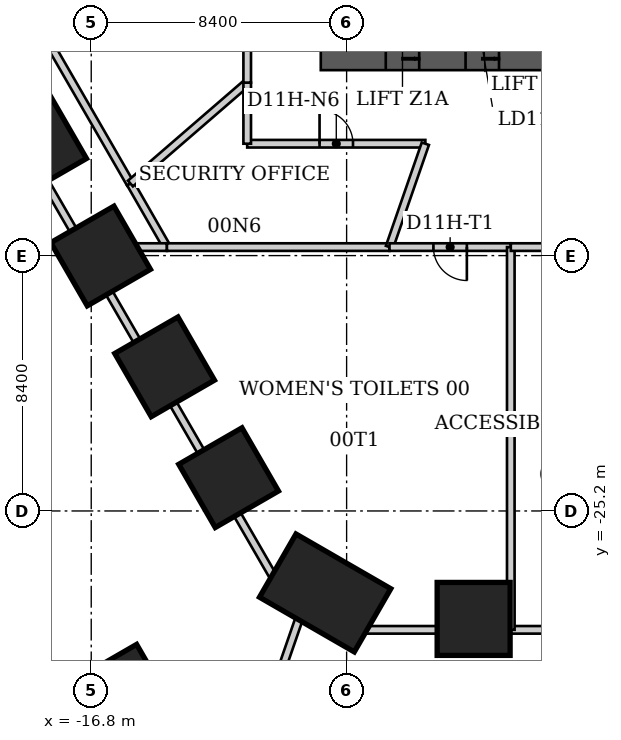
"""IFC4 building model, lengths in metres.
Left out: names, types, materials, properties, quantities, classifications, styles, units other than length and angle.
Written with IfcOpenShell. Run it as: python <this file> out.ifc"""

import sys

from ifc_helpers import new_model, si_unit, direction, frame, frame_2d, origin, origin_2d, place, context, subcontext, project, spatial, rectangle, extrude, element, fill, save


model = new_model("IFC4")
c1 = context("Model", 3, precision=1e-05, world=origin(), true_north=direction((0.0, 1.0)))
c2 = subcontext(c1, "Body", "Model", "MODEL_VIEW")
j1 = project(units=[si_unit("LENGTHUNIT", "METRE"), si_unit("PLANEANGLEUNIT", "RADIAN")], contexts=[c1])
p1 = place(None, origin())
s1 = spatial("IfcSite", under=j1, at=p1, CompositionType="ELEMENT")
p2 = place(p1, origin())
s2 = spatial("IfcBuilding", under=s1, at=p2, CompositionType="ELEMENT")
p3 = place(p2, origin())
s3 = spatial("IfcBuildingStorey", under=s2, at=p3, CompositionType="ELEMENT", Elevation=0.0)
p4 = place(p3, frame((-4.222, -28.751, -0.2), z_axis=(0.0, 0.0, 1.0), x_axis=(0.0, -1.0, 0.0)))
e1 = element("IfcColumn", 1, at=p4, inside=s3, PredefinedType="COLUMN", context=c2, shape_type="SweptSolid", body=[
    extrude(rectangle(XDim=2.4, YDim=2.4, at=origin_2d()), origin(), (0.0, 0.0, 1.0), 6.2),
])
p5 = place(p3, frame((-9.106, -27.897, -0.2), z_axis=(0.0, 0.0, 1.0), x_axis=(-0.5, -0.866025403784, 0.0)))
e2 = element("IfcColumn", 2, at=p5, inside=s3, PredefinedType="COLUMN", context=c2, shape_type="SweptSolid", body=[
    extrude(rectangle(XDim=2.4, YDim=3.6, at=origin_2d()), origin(), (0.0, 0.0, 1.0), 6.2),
])
for number, where, z_axis, x_axis in (
    (3, (-12.282, -24.105, -0.2), (0.0, 0.0, 1.0), (-0.866, -0.5, 0.0)),
    (4, (-14.387, -20.459, -0.2), (0.0, 0.0, 1.0), (-0.866, -0.5, 0.0)),
    (5, (-16.491, -16.813, -0.2), (0.0, 0.0, 1.0), (-0.866, -0.5, 0.0)),
    (6, (-18.596, -13.167, -0.2), (0.0, 0.0, 1.0), (-0.866, -0.5, 0.0)),
):
    element("IfcColumn", number, at=place(p3, frame(where, z_axis=z_axis, x_axis=x_axis)), inside=s3, PredefinedType="COLUMN", context=c2, shape_type="SweptSolid", body=[
        extrude(rectangle(XDim=2.4, YDim=2.4, at=origin_2d()), origin(), (0.0, 0.0, 1.0), 6.2),
    ])
p6 = place(p3, frame((-15.563, -30.546, -0.2), z_axis=(0.0, 0.0, 1.0), x_axis=(-0.866025403784, -0.5, 0.0)))
e7 = element("IfcColumn", 7, at=p6, inside=s3, PredefinedType="COLUMN", context=c2, shape_type="SweptSolid", body=[
    extrude(rectangle(XDim=1.4, YDim=1.4, at=origin_2d()), origin(), (0.0, 0.0, 1.0), 6.2),
])
p7 = place(p3, frame((-9.25, -9.95, -0.2), z_axis=(0.0, 0.0, 1.0), x_axis=(1.0, 0.0, 0.0)))
e8 = element("IfcWall", 8, at=p7, inside=s3, PredefinedType="SHEAR", context=c2, shape_type="SweptSolid", body=[
    extrude(rectangle(XDim=18.5, YDim=1.5, at=frame_2d((9.25, 0.0))), origin(), (0.0, 0.0, 1.0), 6.2),
])
p8 = place(p7, frame((2.137, 0.0, 0.2)))
e9 = element("IfcOpeningElement", 9, at=p8, cuts=e8, PredefinedType="OPENING", context=c2, shape_type="SweptSolid", body=[
    extrude(rectangle(XDim=1.1, YDim=2.1, at=frame_2d((0.55, 1.05))), frame((0.0, 0.75, 0.0), z_axis=(0.0, -1.0, 0.0), x_axis=(1.0, 0.0, 0.0)), (0.0, 0.0, 1.0), 1.5),
])
p9 = place(p7, frame((4.762, 0.0, 0.2)))
e10 = element("IfcOpeningElement", 10, at=p9, cuts=e8, PredefinedType="OPENING", context=c2, shape_type="SweptSolid", body=[
    extrude(rectangle(XDim=1.1, YDim=2.1, at=frame_2d((0.55, 1.05))), frame((0.0, 0.75, 0.0), z_axis=(0.0, -1.0, 0.0), x_axis=(1.0, 0.0, 0.0)), (0.0, 0.0, 1.0), 1.5),
])
p10 = place(p7, frame((7.387, 0.0, 0.2)))
e11 = element("IfcOpeningElement", 11, at=p10, cuts=e8, PredefinedType="OPENING", context=c2, shape_type="SweptSolid", body=[
    extrude(rectangle(XDim=1.1, YDim=2.1, at=frame_2d((0.55, 1.05))), frame((0.0, 0.75, 0.0), z_axis=(0.0, -1.0, 0.0), x_axis=(1.0, 0.0, 0.0)), (0.0, 0.0, 1.0), 1.5),
])
p11 = place(p7, frame((10.012, 0.0, 0.2)))
e12 = element("IfcOpeningElement", 12, at=p11, cuts=e8, PredefinedType="OPENING", context=c2, shape_type="SweptSolid", body=[
    extrude(rectangle(XDim=1.1, YDim=2.1, at=frame_2d((0.55, 1.05))), frame((0.0, 0.75, 0.0), z_axis=(0.0, -1.0, 0.0), x_axis=(1.0, 0.0, 0.0)), (0.0, 0.0, 1.0), 1.5),
])
p12 = place(p7, frame((12.637, 0.0, 0.2)))
e13 = element("IfcOpeningElement", 13, at=p12, cuts=e8, PredefinedType="OPENING", context=c2, shape_type="SweptSolid", body=[
    extrude(rectangle(XDim=1.1, YDim=2.1, at=frame_2d((0.55, 1.05))), frame((0.0, 0.75, 0.0), z_axis=(0.0, -1.0, 0.0), x_axis=(1.0, 0.0, 0.0)), (0.0, 0.0, 1.0), 1.5),
])
p13 = place(p7, frame((15.262, 0.0, 0.2)))
e14 = element("IfcOpeningElement", 14, at=p13, cuts=e8, PredefinedType="OPENING", context=c2, shape_type="SweptSolid", body=[
    extrude(rectangle(XDim=1.1, YDim=2.1, at=frame_2d((0.55, 1.05))), frame((0.0, 0.75, 0.0), z_axis=(0.0, -1.0, 0.0), x_axis=(1.0, 0.0, 0.0)), (0.0, 0.0, 1.0), 1.5),
])
p14 = place(p3, frame((-27.14, 5.71, 0.0), z_axis=(0.0, 0.0, 1.0), x_axis=(0.499871788402, -0.866099414132, 0.0)))
e15 = element("IfcWall", 15, at=p14, inside=s3, PredefinedType="PARTITIONING", context=c2, shape_type="SweptSolid", body=[
    extrude(rectangle(XDim=23.257, YDim=0.25, at=frame_2d((11.628, 0.0))), origin(), (0.0, 0.0, 1.0), 5.84),
])
p15 = place(p14, frame((9.979, 0.0, 0.0)))
e16 = element("IfcOpeningElement", 16, at=p15, cuts=e15, PredefinedType="OPENING", context=c2, shape_type="SweptSolid", body=[
    extrude(rectangle(XDim=1.6, YDim=2.4, at=frame_2d((0.8, 1.2))), frame((0.0, 0.125, 0.0), z_axis=(0.0, -1.0, 0.0), x_axis=(1.0, 0.0, 0.0)), (0.0, 0.0, 1.0), 0.25),
])
p16 = place(p3, frame((-21.66, -8.58, 0.0), z_axis=(0.0, 0.0, 1.0), x_axis=(0.50046740921, -0.865755376719, 0.0)))
e17 = element("IfcWall", 17, at=p16, inside=s3, PredefinedType="PARTITIONING", context=c2, shape_type="SweptSolid", body=[
    extrude(rectangle(XDim=9.171, YDim=0.25, at=frame_2d((4.585, 0.0))), origin(), (0.0, 0.0, 1.0), 4.04),
])
p17 = place(p16, frame((3.086, 0.0, 0.0)))
e18 = element("IfcOpeningElement", 18, at=p17, cuts=e17, PredefinedType="OPENING", context=c2, shape_type="SweptSolid", body=[
    extrude(rectangle(XDim=1.1, YDim=2.2, at=frame_2d((0.55, 1.1))), frame((0.0, 0.125, 0.0), z_axis=(0.0, -1.0, 0.0), x_axis=(1.0, 0.0, 0.0)), (0.0, 0.0, 1.0), 0.25),
])
p18 = place(p3, frame((-17.08, -16.52, 0.0), z_axis=(0.0, 0.0, 1.0), x_axis=(0.500484795969, -0.865745325719, 0.0)))
e19 = element("IfcWall", 19, at=p18, inside=s3, PredefinedType="PARTITIONING", context=c2, shape_type="SweptSolid", body=[
    extrude(rectangle(XDim=13.387, YDim=0.25, at=frame_2d((6.694, 0.0))), origin(), (0.0, 0.0, 1.0), 4.04),
])
p19 = place(p3, frame((-15.87, -45.802, 0.0), z_axis=(0.0, 0.0, 1.0), x_axis=(0.327267371913, 0.944931779168, 0.0)))
e20 = element("IfcWall", 20, at=p19, inside=s3, PredefinedType="PARTITIONING", context=c2, shape_type="SweptSolid", body=[
    extrude(rectangle(XDim=18.395, YDim=0.25, at=frame_2d((9.197, 0.0))), origin(), (0.0, 0.0, 1.0), 5.75),
])
p20 = place(p3, frame((-15.51, -14.43, 0.0), z_axis=(0.0, 0.0, 1.0), x_axis=(0.497894326365, -0.867237706614, 0.0)))
e21 = element("IfcWall", 21, at=p20, inside=s3, PredefinedType="PARTITIONING", context=c2, shape_type="SweptSolid", body=[
    extrude(rectangle(XDim=2.41, YDim=0.25, at=frame_2d((1.205, 0.0))), origin(), (0.0, 0.0, 1.0), 5.84),
])
p21 = place(p3, frame((-14.31, -16.52, 0.0), z_axis=(0.0, 0.0, 1.0), x_axis=(-1.0, 0.0, 0.0)))
e22 = element("IfcWall", 22, at=p21, inside=s3, PredefinedType="PARTITIONING", context=c2, shape_type="SweptSolid", body=[
    extrude(rectangle(XDim=2.76, YDim=0.25, at=frame_2d((1.38, 0.0))), origin(), (0.0, 0.0, 1.0), 5.84),
])
p22 = place(p3, frame((-11.67, -13.12, 0.0), z_axis=(0.0, 0.0, 1.0), x_axis=(1.0, 0.0, 0.0)))
e23 = element("IfcWall", 23, at=p22, inside=s3, PredefinedType="PARTITIONING", context=c2, shape_type="SweptSolid", body=[
    extrude(rectangle(XDim=5.86, YDim=0.25, at=frame_2d((2.93, 0.0))), origin(), (0.0, 0.0, 1.0), 5.84),
])
p23 = place(p22, frame((2.38, 0.0, 0.0)))
e24 = element("IfcOpeningElement", 24, at=p23, cuts=e23, PredefinedType="OPENING", context=c2, shape_type="SweptSolid", body=[
    extrude(rectangle(XDim=1.1, YDim=2.2, at=frame_2d((0.55, 1.1))), frame((0.0, 0.125, 0.0), z_axis=(0.0, -1.0, 0.0), x_axis=(1.0, 0.0, 0.0)), (0.0, 0.0, 1.0), 0.25),
])
p24 = place(p3, frame((-11.67, -11.11, 0.0), z_axis=(0.0, 0.0, 1.0), x_axis=(-0.756493073491, -0.654001704707, 0.0)))
e25 = element("IfcWall", 25, at=p24, inside=s3, PredefinedType="PARTITIONING", context=c2, shape_type="SweptSolid", body=[
    extrude(rectangle(XDim=5.076, YDim=0.25, at=frame_2d((2.538, 0.0))), origin(), (0.0, 0.0, 1.0), 5.238),
])
p25 = place(p3, frame((-11.67, -11.11, 0.0), z_axis=(0.0, 0.0, 1.0), x_axis=(0.0, -1.0, 0.0)))
e26 = element("IfcWall", 26, at=p25, inside=s3, PredefinedType="PARTITIONING", context=c2, shape_type="SweptSolid", body=[
    extrude(rectangle(XDim=2.01, YDim=0.25, at=frame_2d((1.005, 0.0))), origin(), (0.0, 0.0, 1.0), 5.84),
])
p26 = place(p3, frame((-11.67, 10.02, 0.0), z_axis=(0.0, 0.0, 1.0), x_axis=(0.0, -1.0, 0.0)))
e27 = element("IfcWall", 27, at=p26, inside=s3, PredefinedType="PARTITIONING", context=c2, shape_type="SweptSolid", body=[
    extrude(rectangle(XDim=21.13, YDim=0.25, at=frame_2d((10.565, 0.0))), origin(), (0.0, 0.0, 1.0), 5.84),
])
p27 = place(p3, frame((-10.38, -28.11, 0.0), z_axis=(0.0, 0.0, 1.0), x_axis=(0.865714845822, -0.5005375168, 0.0)))
e28 = element("IfcWall", 28, at=p27, inside=s3, PredefinedType="PARTITIONING", context=c2, shape_type="SweptSolid", body=[
    extrude(rectangle(XDim=0.579, YDim=0.25, at=frame_2d((0.29, 0.0))), origin(), (0.0, 0.0, 1.0), 5.84),
])
p28 = place(p3, frame((-8.65, -29.11, 0.0), z_axis=(0.0, 0.0, 1.0), x_axis=(-0.866883441829, 0.498510880807, 0.0)))
e29 = element("IfcWall", 29, at=p28, inside=s3, PredefinedType="PARTITIONING", context=c2, shape_type="SweptSolid", body=[
    extrude(rectangle(XDim=1.385, YDim=0.25, at=frame_2d((0.692, 0.0))), origin(), (0.0, 0.0, 1.0), 5.84),
])
p29 = place(p3, frame((-8.65, -29.11, 0.0), z_axis=(0.0, 0.0, 1.0), x_axis=(1.0, 0.0, 0.0)))
e30 = element("IfcWall", 30, at=p29, inside=s3, PredefinedType="PARTITIONING", context=c2, shape_type="SweptSolid", body=[
    extrude(rectangle(XDim=5.65, YDim=0.25, at=frame_2d((2.825, 0.0))), origin(), (0.0, 0.0, 1.0), 4.04),
])
p30 = place(p3, frame((-6.99, -16.52, 0.0), z_axis=(0.0, 0.0, 1.0), x_axis=(-1.0, 0.0, 0.0)))
e31 = element("IfcWall", 31, at=p30, inside=s3, PredefinedType="PARTITIONING", context=c2, shape_type="SweptSolid", body=[
    extrude(rectangle(XDim=7.32, YDim=0.25, at=frame_2d((3.66, 0.0))), origin(), (0.0, 0.0, 1.0), 5.84),
])
p31 = place(p3, frame((-5.81, -13.12, 0.0), z_axis=(0.0, 0.0, 1.0), x_axis=(-0.327865380048, -0.944724453249, 0.0)))
e32 = element("IfcWall", 32, at=p31, inside=s3, PredefinedType="PARTITIONING", context=c2, shape_type="SweptSolid", body=[
    extrude(rectangle(XDim=3.599, YDim=0.25, at=frame_2d((1.799, 0.0))), origin(), (0.0, 0.0, 1.0), 5.84),
])
p32 = place(p3, frame((-3.0, -29.11, 0.0), z_axis=(0.0, 0.0, 1.0), x_axis=(1.0, 0.0, 0.0)))
e33 = element("IfcWall", 33, at=p32, inside=s3, PredefinedType="PARTITIONING", context=c2, shape_type="SweptSolid", body=[
    extrude(rectangle(XDim=6.0, YDim=0.25, at=frame_2d((3.0, 0.0))), origin(), (0.0, 0.0, 1.0), 4.04),
])
p33 = place(p3, frame((-3.0, -16.52, 0.0), z_axis=(0.0, 0.0, 1.0), x_axis=(-1.0, 0.0, 0.0)))
e34 = element("IfcWall", 34, at=p33, inside=s3, PredefinedType="PARTITIONING", context=c2, shape_type="SweptSolid", body=[
    extrude(rectangle(XDim=3.99, YDim=0.25, at=frame_2d((1.995, 0.0))), origin(), (0.0, 0.0, 1.0), 5.84),
])
p34 = place(p33, frame((1.445, 0.0, 0.0)))
e35 = element("IfcOpeningElement", 35, at=p34, cuts=e34, PredefinedType="OPENING", context=c2, shape_type="SweptSolid", body=[
    extrude(rectangle(XDim=1.1, YDim=2.2, at=frame_2d((0.55, 1.1))), frame((0.0, 0.125, 0.0), z_axis=(0.0, -1.0, 0.0), x_axis=(1.0, 0.0, 0.0)), (0.0, 0.0, 1.0), 0.25),
])
p35 = place(p3, frame((-3.0, -16.52, 0.0), z_axis=(0.0, 0.0, 1.0), x_axis=(0.0, -1.0, 0.0)))
e36 = element("IfcWall", 36, at=p35, inside=s3, PredefinedType="PARTITIONING", context=c2, shape_type="SweptSolid", body=[
    extrude(rectangle(XDim=12.59, YDim=0.25, at=frame_2d((6.295, 0.0))), origin(), (0.0, 0.0, 1.0), 5.84),
])
p36 = place(p3, frame((3.0, -16.52, 0.0), z_axis=(0.0, 0.0, 1.0), x_axis=(-1.0, 0.0, 0.0)))
e37 = element("IfcWall", 37, at=p36, inside=s3, PredefinedType="PARTITIONING", context=c2, shape_type="SweptSolid", body=[
    extrude(rectangle(XDim=6.0, YDim=0.25, at=frame_2d((3.0, 0.0))), origin(), (0.0, 0.0, 1.0), 5.84),
])
p37 = place(p36, frame((2.45, 0.0, 0.0)))
e38 = element("IfcOpeningElement", 38, at=p37, cuts=e37, PredefinedType="OPENING", context=c2, shape_type="SweptSolid", body=[
    extrude(rectangle(XDim=1.1, YDim=2.2, at=frame_2d((0.55, 1.1))), frame((0.0, 0.125, 0.0), z_axis=(0.0, -1.0, 0.0), x_axis=(1.0, 0.0, 0.0)), (0.0, 0.0, 1.0), 0.25),
])
p38 = place(p23, origin())
e39 = element("IfcDoor", 39, at=p38, inside=s3, OperationType="SINGLE_SWING_LEFT", PredefinedType="DOOR", context=c2, shape_type="SweptSolid", body=[
    extrude(rectangle(XDim=1.1, YDim=2.2, at=frame_2d((0.55, 1.1))), frame((0.0, 0.025, 0.0), z_axis=(0.0, -1.0, 0.0), x_axis=(1.0, 0.0, 0.0)), (0.0, 0.0, 1.0), 0.05),
])
fill(e24, e39)
p39 = place(p34, origin())
e40 = element("IfcDoor", 40, at=p39, inside=s3, OperationType="SINGLE_SWING_LEFT", PredefinedType="DOOR", context=c2, shape_type="SweptSolid", body=[
    extrude(rectangle(XDim=1.1, YDim=2.2, at=frame_2d((0.55, 1.1))), frame((0.0, 0.025, 0.0), z_axis=(0.0, -1.0, 0.0), x_axis=(1.0, 0.0, 0.0)), (0.0, 0.0, 1.0), 0.05),
])
fill(e35, e40)
save(model, sys.argv[1])
